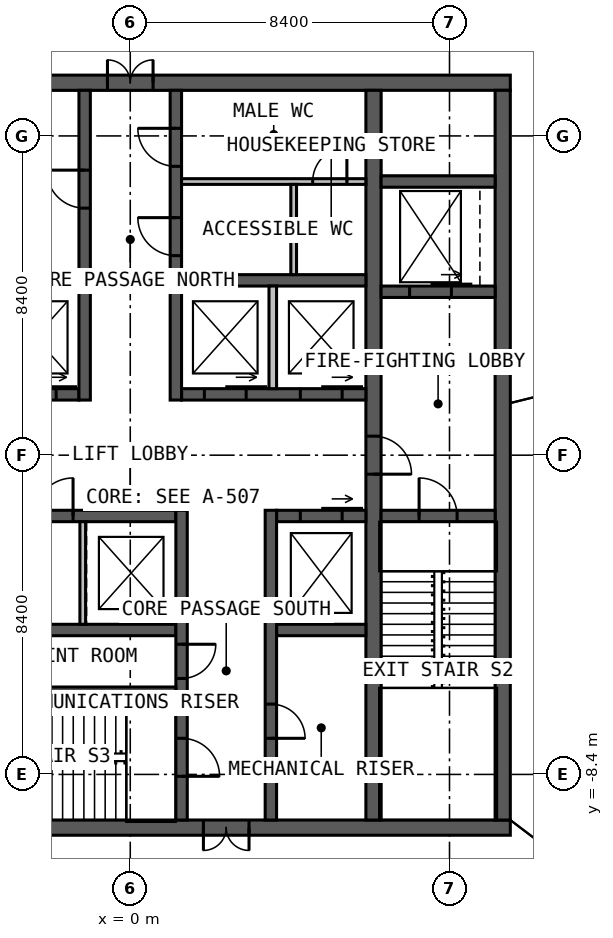
"""IFC4 building model, lengths in metres.
Left out: names, types, materials, properties, quantities, classifications, styles, units other than length and angle.
Written with IfcOpenShell. Run it as: python <this file> out.ifc"""

import sys

from ifc_helpers import new_model, si_unit, direction, frame, frame_2d, origin, place, context, subcontext, project, spatial, rectangle, extrude, element, fill, save


model = new_model("IFC4")
c1 = context("Model", 3, precision=1e-05, world=origin(), true_north=direction((0.0, 1.0)))
c2 = subcontext(c1, "Body", "Model", "MODEL_VIEW")
j1 = project(units=[si_unit("LENGTHUNIT", "METRE"), si_unit("PLANEANGLEUNIT", "RADIAN")], contexts=[c1])
p1 = place(None, origin())
s1 = spatial("IfcSite", under=j1, at=p1, CompositionType="ELEMENT")
p2 = place(p1, origin())
s2 = spatial("IfcBuilding", under=s1, at=p2, CompositionType="ELEMENT")
p3 = place(p2, frame((0.0, 0.0, 260.0)))
s3 = spatial("IfcBuildingStorey", under=s2, at=p3, CompositionType="ELEMENT", Elevation=260.0)
p4 = place(p3, frame((-10.0, 9.8, 0.0), z_axis=(0.0, 0.0, 1.0), x_axis=(1.0, 0.0, 0.0)))
e1 = element("IfcWall", 1, at=p4, inside=s3, PredefinedType="SOLIDWALL", context=c2, shape_type="SweptSolid", body=[
    extrude(rectangle(XDim=20.0, YDim=0.4, at=frame_2d((10.0, 0.0))), origin(), (0.0, 0.0, 1.0), 4.0),
])
p5 = place(p4, frame((9.4, 0.0, 0.0)))
e2 = element("IfcOpeningElement", 2, at=p5, cuts=e1, PredefinedType="OPENING", context=c2, shape_type="SweptSolid", body=[
    extrude(rectangle(XDim=1.2, YDim=2.2, at=frame_2d((0.6, 1.1))), frame((0.0, 0.21, 0.0), z_axis=(0.0, -1.0, 0.0), x_axis=(1.0, 0.0, 0.0)), (0.0, 0.0, 1.0), 0.42),
])
p6 = place(p3, frame((10.0, -9.8, 0.0), z_axis=(0.0, 0.0, 1.0), x_axis=(-1.0, 0.0, 0.0)))
e3 = element("IfcWall", 3, at=p6, inside=s3, PredefinedType="SOLIDWALL", context=c2, shape_type="SweptSolid", body=[
    extrude(rectangle(XDim=20.0, YDim=0.4, at=frame_2d((10.0, 0.0))), origin(), (0.0, 0.0, 1.0), 4.0),
])
p7 = place(p6, frame((6.875, 0.0, 0.0)))
e4 = element("IfcOpeningElement", 4, at=p7, cuts=e3, PredefinedType="OPENING", context=c2, shape_type="SweptSolid", body=[
    extrude(rectangle(XDim=1.2, YDim=2.2, at=frame_2d((0.6, 1.1))), frame((0.0, 0.21, 0.0), z_axis=(0.0, -1.0, 0.0), x_axis=(1.0, 0.0, 0.0)), (0.0, 0.0, 1.0), 0.42),
])
p8 = place(p3, frame((9.8, -9.6, 0.0), z_axis=(0.0, 0.0, 1.0), x_axis=(0.0, 1.0, 0.0)))
e5 = element("IfcWall", 5, at=p8, inside=s3, PredefinedType="SOLIDWALL", context=c2, shape_type="SweptSolid", body=[
    extrude(rectangle(XDim=19.2, YDim=0.4, at=frame_2d((9.6, 0.0))), origin(), (0.0, 0.0, 1.0), 4.0),
])
p9 = place(p3, frame((6.4, 9.6, 0.0), z_axis=(0.0, 0.0, 1.0), x_axis=(0.0, -1.0, 0.0)))
e6 = element("IfcWall", 6, at=p9, inside=s3, PredefinedType="SOLIDWALL", context=c2, shape_type="SweptSolid", body=[
    extrude(rectangle(XDim=19.2, YDim=0.4, at=frame_2d((9.6, 0.0))), origin(), (0.0, 0.0, 1.0), 4.0),
])
p10 = place(p9, frame((9.1, 0.0, 0.0)))
e7 = element("IfcOpeningElement", 7, at=p10, cuts=e6, PredefinedType="OPENING", context=c2, shape_type="SweptSolid", body=[
    extrude(rectangle(XDim=1.0, YDim=2.2, at=frame_2d((0.5, 1.1))), frame((0.0, 0.21, 0.0), z_axis=(0.0, -1.0, 0.0), x_axis=(1.0, 0.0, 0.0)), (0.0, 0.0, 1.0), 0.42),
])
p11 = place(p3, frame((-6.2, 1.6, 0.0), z_axis=(0.0, 0.0, 1.0), x_axis=(1.0, 0.0, 0.0)))
e8 = element("IfcWall", 8, at=p11, inside=s3, PredefinedType="SOLIDWALL", context=c2, shape_type="SweptSolid", body=[
    extrude(rectangle(XDim=4.85, YDim=0.3, at=frame_2d((2.425, 0.0))), origin(), (0.0, 0.0, 1.0), 4.0),
])
p12 = place(p11, frame((0.625, 0.0, 0.0)))
e9 = element("IfcOpeningElement", 9, at=p12, cuts=e8, PredefinedType="OPENING", context=c2, shape_type="SweptSolid", body=[
    extrude(rectangle(XDim=1.1, YDim=2.2, at=frame_2d((0.55, 1.1))), frame((0.0, 0.16, 0.0), z_axis=(0.0, -1.0, 0.0), x_axis=(1.0, 0.0, 0.0)), (0.0, 0.0, 1.0), 0.32),
])
p13 = place(p11, frame((3.15, 0.0, 0.0)))
e10 = element("IfcOpeningElement", 10, at=p13, cuts=e8, PredefinedType="OPENING", context=c2, shape_type="SweptSolid", body=[
    extrude(rectangle(XDim=1.1, YDim=2.2, at=frame_2d((0.55, 1.1))), frame((0.0, 0.16, 0.0), z_axis=(0.0, -1.0, 0.0), x_axis=(1.0, 0.0, 0.0)), (0.0, 0.0, 1.0), 0.32),
])
p14 = place(p3, frame((1.35, 1.6, 0.0), z_axis=(0.0, 0.0, 1.0), x_axis=(1.0, 0.0, 0.0)))
e11 = element("IfcWall", 11, at=p14, inside=s3, PredefinedType="SOLIDWALL", context=c2, shape_type="SweptSolid", body=[
    extrude(rectangle(XDim=4.85, YDim=0.3, at=frame_2d((2.425, 0.0))), origin(), (0.0, 0.0, 1.0), 4.0),
])
p15 = place(p14, frame((0.6, 0.0, 0.0)))
e12 = element("IfcOpeningElement", 12, at=p15, cuts=e11, PredefinedType="OPENING", context=c2, shape_type="SweptSolid", body=[
    extrude(rectangle(XDim=1.1, YDim=2.2, at=frame_2d((0.55, 1.1))), frame((0.0, 0.16, 0.0), z_axis=(0.0, -1.0, 0.0), x_axis=(1.0, 0.0, 0.0)), (0.0, 0.0, 1.0), 0.32),
])
p16 = place(p14, frame((3.125, 0.0, 0.0)))
e13 = element("IfcOpeningElement", 13, at=p16, cuts=e11, PredefinedType="OPENING", context=c2, shape_type="SweptSolid", body=[
    extrude(rectangle(XDim=1.1, YDim=2.2, at=frame_2d((0.55, 1.1))), frame((0.0, 0.16, 0.0), z_axis=(0.0, -1.0, 0.0), x_axis=(1.0, 0.0, 0.0)), (0.0, 0.0, 1.0), 0.32),
])
for number, where, z_axis, x_axis in (
    (14, (-6.2, 4.6, 0.0), (0.0, 0.0, 1.0), (1.0, 0.0, 0.0)),
    (15, (1.35, 4.6, 0.0), (0.0, 0.0, 1.0), (1.0, 0.0, 0.0)),
):
    element("IfcWall", number, at=place(p3, frame(where, z_axis=z_axis, x_axis=x_axis)), inside=s3, PredefinedType="SOLIDWALL", context=c2, shape_type="SweptSolid", body=[
        extrude(rectangle(XDim=4.85, YDim=0.3, at=frame_2d((2.425, 0.0))), origin(), (0.0, 0.0, 1.0), 4.0),
    ])
p17 = place(p3, frame((-1.2, 1.45, 0.0), z_axis=(0.0, 0.0, 1.0), x_axis=(0.0, 1.0, 0.0)))
e16 = element("IfcWall", 16, at=p17, inside=s3, PredefinedType="SOLIDWALL", context=c2, shape_type="SweptSolid", body=[
    extrude(rectangle(XDim=8.15, YDim=0.3, at=frame_2d((4.075, 0.0))), origin(), (0.0, 0.0, 1.0), 4.0),
])
p18 = place(p17, frame((5.05, 0.0, 0.0)))
e17 = element("IfcOpeningElement", 17, at=p18, cuts=e16, PredefinedType="OPENING", context=c2, shape_type="SweptSolid", body=[
    extrude(rectangle(XDim=1.0, YDim=2.2, at=frame_2d((0.5, 1.1))), frame((0.0, 0.16, 0.0), z_axis=(0.0, -1.0, 0.0), x_axis=(1.0, 0.0, 0.0)), (0.0, 0.0, 1.0), 0.32),
])
p19 = place(p3, frame((1.2, 1.45, 0.0), z_axis=(0.0, 0.0, 1.0), x_axis=(0.0, 1.0, 0.0)))
e18 = element("IfcWall", 18, at=p19, inside=s3, PredefinedType="SOLIDWALL", context=c2, shape_type="SweptSolid", body=[
    extrude(rectangle(XDim=8.15, YDim=0.3, at=frame_2d((4.075, 0.0))), origin(), (0.0, 0.0, 1.0), 4.0),
])
p20 = place(p19, frame((3.8, 0.0, 0.0)))
e19 = element("IfcOpeningElement", 19, at=p20, cuts=e18, PredefinedType="OPENING", context=c2, shape_type="SweptSolid", body=[
    extrude(rectangle(XDim=1.0, YDim=2.2, at=frame_2d((0.5, 1.1))), frame((0.0, 0.16, 0.0), z_axis=(0.0, -1.0, 0.0), x_axis=(1.0, 0.0, 0.0)), (0.0, 0.0, 1.0), 0.32),
])
p21 = place(p19, frame((6.15, 0.0, 0.0)))
e20 = element("IfcOpeningElement", 20, at=p21, cuts=e18, PredefinedType="OPENING", context=c2, shape_type="SweptSolid", body=[
    extrude(rectangle(XDim=1.0, YDim=2.2, at=frame_2d((0.5, 1.1))), frame((0.0, 0.16, 0.0), z_axis=(0.0, -1.0, 0.0), x_axis=(1.0, 0.0, 0.0)), (0.0, 0.0, 1.0), 0.32),
])
p22 = place(p3, frame((-6.2, -1.6, 0.0), z_axis=(0.0, 0.0, 1.0), x_axis=(1.0, 0.0, 0.0)))
e21 = element("IfcWall", 21, at=p22, inside=s3, PredefinedType="SOLIDWALL", context=c2, shape_type="SweptSolid", body=[
    extrude(rectangle(XDim=7.4, YDim=0.3, at=frame_2d((3.7, 0.0))), origin(), (0.0, 0.0, 1.0), 4.0),
])
p23 = place(p22, frame((0.675, 0.0, 0.0)))
e22 = element("IfcOpeningElement", 22, at=p23, cuts=e21, PredefinedType="OPENING", context=c2, shape_type="SweptSolid", body=[
    extrude(rectangle(XDim=1.0, YDim=2.2, at=frame_2d((0.5, 1.1))), frame((0.0, 0.16, 0.0), z_axis=(0.0, -1.0, 0.0), x_axis=(1.0, 0.0, 0.0)), (0.0, 0.0, 1.0), 0.32),
])
p24 = place(p22, frame((2.225, 0.0, 0.0)))
e23 = element("IfcOpeningElement", 23, at=p24, cuts=e21, PredefinedType="OPENING", context=c2, shape_type="SweptSolid", body=[
    extrude(rectangle(XDim=1.0, YDim=2.2, at=frame_2d((0.5, 1.1))), frame((0.0, 0.16, 0.0), z_axis=(0.0, -1.0, 0.0), x_axis=(1.0, 0.0, 0.0)), (0.0, 0.0, 1.0), 0.32),
])
p25 = place(p22, frame((3.695, 0.0, 0.0)))
e24 = element("IfcOpeningElement", 24, at=p25, cuts=e21, PredefinedType="OPENING", context=c2, shape_type="SweptSolid", body=[
    extrude(rectangle(XDim=1.0, YDim=2.2, at=frame_2d((0.5, 1.1))), frame((0.0, 0.16, 0.0), z_axis=(0.0, -1.0, 0.0), x_axis=(1.0, 0.0, 0.0)), (0.0, 0.0, 1.0), 0.32),
])
p26 = place(p3, frame((3.85, -1.6, 0.0), z_axis=(0.0, 0.0, 1.0), x_axis=(1.0, 0.0, 0.0)))
e25 = element("IfcWall", 25, at=p26, inside=s3, PredefinedType="SOLIDWALL", context=c2, shape_type="SweptSolid", body=[
    extrude(rectangle(XDim=2.35, YDim=0.3, at=frame_2d((1.175, 0.0))), origin(), (0.0, 0.0, 1.0), 4.0),
])
p27 = place(p26, frame((0.625, 0.0, 0.0)))
e26 = element("IfcOpeningElement", 26, at=p27, cuts=e25, PredefinedType="OPENING", context=c2, shape_type="SweptSolid", body=[
    extrude(rectangle(XDim=1.1, YDim=2.2, at=frame_2d((0.55, 1.1))), frame((0.0, 0.16, 0.0), z_axis=(0.0, -1.0, 0.0), x_axis=(1.0, 0.0, 0.0)), (0.0, 0.0, 1.0), 0.32),
])
p28 = place(p3, frame((-6.2, -4.6, 0.0), z_axis=(0.0, 0.0, 1.0), x_axis=(1.0, 0.0, 0.0)))
e27 = element("IfcWall", 27, at=p28, inside=s3, PredefinedType="SOLIDWALL", context=c2, shape_type="SweptSolid", body=[
    extrude(rectangle(XDim=7.4, YDim=0.3, at=frame_2d((3.7, 0.0))), origin(), (0.0, 0.0, 1.0), 4.0),
])
p29 = place(p3, frame((3.85, -4.6, 0.0), z_axis=(0.0, 0.0, 1.0), x_axis=(1.0, 0.0, 0.0)))
e28 = element("IfcWall", 28, at=p29, inside=s3, PredefinedType="SOLIDWALL", context=c2, shape_type="SweptSolid", body=[
    extrude(rectangle(XDim=2.35, YDim=0.3, at=frame_2d((1.175, 0.0))), origin(), (0.0, 0.0, 1.0), 4.0),
])
p30 = place(p3, frame((1.35, -1.45, 0.0), z_axis=(0.0, 0.0, 1.0), x_axis=(0.0, -1.0, 0.0)))
e29 = element("IfcWall", 29, at=p30, inside=s3, PredefinedType="SOLIDWALL", context=c2, shape_type="SweptSolid", body=[
    extrude(rectangle(XDim=8.15, YDim=0.3, at=frame_2d((4.075, 0.0))), origin(), (0.0, 0.0, 1.0), 4.0),
])
p31 = place(p30, frame((6.0, 0.0, 0.0)))
e30 = element("IfcOpeningElement", 30, at=p31, cuts=e29, PredefinedType="OPENING", context=c2, shape_type="SweptSolid", body=[
    extrude(rectangle(XDim=1.0, YDim=2.2, at=frame_2d((0.5, 1.1))), frame((0.0, 0.16, 0.0), z_axis=(0.0, -1.0, 0.0), x_axis=(1.0, 0.0, 0.0)), (0.0, 0.0, 1.0), 0.32),
])
p32 = place(p30, frame((3.525, 0.0, 0.0)))
e31 = element("IfcOpeningElement", 31, at=p32, cuts=e29, PredefinedType="OPENING", context=c2, shape_type="SweptSolid", body=[
    extrude(rectangle(XDim=0.9, YDim=2.2, at=frame_2d((0.45, 1.1))), frame((0.0, 0.16, 0.0), z_axis=(0.0, -1.0, 0.0), x_axis=(1.0, 0.0, 0.0)), (0.0, 0.0, 1.0), 0.32),
])
p33 = place(p3, frame((3.7, -1.45, 0.0), z_axis=(0.0, 0.0, 1.0), x_axis=(0.0, -1.0, 0.0)))
e32 = element("IfcWall", 32, at=p33, inside=s3, PredefinedType="SOLIDWALL", context=c2, shape_type="SweptSolid", body=[
    extrude(rectangle(XDim=8.15, YDim=0.3, at=frame_2d((4.075, 0.0))), origin(), (0.0, 0.0, 1.0), 4.0),
])
p34 = place(p33, frame((5.1, 0.0, 0.0)))
e33 = element("IfcOpeningElement", 33, at=p34, cuts=e32, PredefinedType="OPENING", context=c2, shape_type="SweptSolid", body=[
    extrude(rectangle(XDim=0.9, YDim=2.2, at=frame_2d((0.45, 1.1))), frame((0.0, 0.16, 0.0), z_axis=(0.0, -1.0, 0.0), x_axis=(1.0, 0.0, 0.0)), (0.0, 0.0, 1.0), 0.32),
])
p35 = place(p3, frame((-6.2, -6.2, 0.0), z_axis=(0.0, 0.0, 1.0), x_axis=(1.0, 0.0, 0.0)))
e34 = element("IfcWall", 34, at=p35, inside=s3, PredefinedType="SOLIDWALL", context=c2, shape_type="SweptSolid", body=[
    extrude(rectangle(XDim=7.4, YDim=0.2, at=frame_2d((3.7, 0.0))), origin(), (0.0, 0.0, 1.0), 4.0),
])
p36 = place(p3, frame((6.6, -1.6, 0.0), z_axis=(0.0, 0.0, 1.0), x_axis=(1.0, 0.0, 0.0)))
e35 = element("IfcWall", 35, at=p36, inside=s3, PredefinedType="SOLIDWALL", context=c2, shape_type="SweptSolid", body=[
    extrude(rectangle(XDim=3.0, YDim=0.3, at=frame_2d((1.5, 0.0))), origin(), (0.0, 0.0, 1.0), 4.0),
])
p37 = place(p36, frame((1.0, 0.0, 0.0)))
e36 = element("IfcOpeningElement", 36, at=p37, cuts=e35, PredefinedType="OPENING", context=c2, shape_type="SweptSolid", body=[
    extrude(rectangle(XDim=1.0, YDim=2.2, at=frame_2d((0.5, 1.1))), frame((0.0, 0.16, 0.0), z_axis=(0.0, -1.0, 0.0), x_axis=(1.0, 0.0, 0.0)), (0.0, 0.0, 1.0), 0.32),
])
p38 = place(p3, frame((6.6, 4.3, 0.0), z_axis=(0.0, 0.0, 1.0), x_axis=(1.0, 0.0, 0.0)))
e37 = element("IfcWall", 37, at=p38, inside=s3, PredefinedType="SOLIDWALL", context=c2, shape_type="SweptSolid", body=[
    extrude(rectangle(XDim=3.0, YDim=0.3, at=frame_2d((1.5, 0.0))), origin(), (0.0, 0.0, 1.0), 4.0),
])
p39 = place(p38, frame((0.75, 0.0, 0.0)))
e38 = element("IfcOpeningElement", 38, at=p39, cuts=e37, PredefinedType="OPENING", context=c2, shape_type="SweptSolid", body=[
    extrude(rectangle(XDim=1.1, YDim=2.2, at=frame_2d((0.55, 1.1))), frame((0.0, 0.16, 0.0), z_axis=(0.0, -1.0, 0.0), x_axis=(1.0, 0.0, 0.0)), (0.0, 0.0, 1.0), 0.32),
])
p40 = place(p3, frame((6.6, 7.2, 0.0), z_axis=(0.0, 0.0, 1.0), x_axis=(1.0, 0.0, 0.0)))
e39 = element("IfcWall", 39, at=p40, inside=s3, PredefinedType="SOLIDWALL", context=c2, shape_type="SweptSolid", body=[
    extrude(rectangle(XDim=3.0, YDim=0.3, at=frame_2d((1.5, 0.0))), origin(), (0.0, 0.0, 1.0), 4.0),
])
p41 = place(p3, frame((3.75, 1.75, 0.0), z_axis=(0.0, 0.0, 1.0), x_axis=(0.0, 1.0, 0.0)))
e40 = element("IfcWall", 40, at=p41, inside=s3, PredefinedType="SOLIDWALL", context=c2, shape_type="SweptSolid", body=[
    extrude(rectangle(XDim=2.7, YDim=0.2, at=frame_2d((1.35, 0.0))), origin(), (0.0, 0.0, 1.0), 3.75),
])
p42 = place(p3, frame((1.35, 7.2, 0.0), z_axis=(0.0, 0.0, 1.0), x_axis=(1.0, 0.0, 0.0)))
e41 = element("IfcWall", 41, at=p42, inside=s3, PredefinedType="PARTITIONING", context=c2, shape_type="SweptSolid", body=[
    extrude(rectangle(XDim=4.85, YDim=0.15, at=frame_2d((2.425, 0.0))), origin(), (0.0, 0.0, 1.0), 3.75),
])
p43 = place(p42, frame((3.45, 0.0, 0.0)))
e42 = element("IfcOpeningElement", 42, at=p43, cuts=e41, PredefinedType="OPENING", context=c2, shape_type="SweptSolid", body=[
    extrude(rectangle(XDim=0.9, YDim=2.2, at=frame_2d((0.45, 1.1))), frame((0.0, 0.085, 0.0), z_axis=(0.0, -1.0, 0.0), x_axis=(1.0, 0.0, 0.0)), (0.0, 0.0, 1.0), 0.17),
])
p44 = place(p3, frame((4.3, 4.75, 0.0), z_axis=(0.0, 0.0, 1.0), x_axis=(0.0, 1.0, 0.0)))
e43 = element("IfcWall", 43, at=p44, inside=s3, PredefinedType="PARTITIONING", context=c2, shape_type="SweptSolid", body=[
    extrude(rectangle(XDim=2.375, YDim=0.15, at=frame_2d((1.188, 0.0))), origin(), (0.0, 0.0, 1.0), 3.75),
])
p45 = place(p3, frame((-1.25, -1.75, 0.0), z_axis=(0.0, 0.0, 1.0), x_axis=(0.0, -1.0, 0.0)))
e44 = element("IfcWall", 44, at=p45, inside=s3, PredefinedType="PARTITIONING", context=c2, shape_type="SweptSolid", body=[
    extrude(rectangle(XDim=2.7, YDim=0.15, at=frame_2d((1.35, 0.0))), origin(), (0.0, 0.0, 1.0), 3.75),
])
p46 = place(p5, origin())
e45 = element("IfcDoor", 45, at=p46, inside=s3, OperationType="DOUBLE_DOOR_SINGLE_SWING", PredefinedType="DOOR", context=c2, shape_type="SweptSolid", body=[
    extrude(rectangle(XDim=1.2, YDim=2.2, at=frame_2d((0.6, 1.1))), frame((0.0, 0.025, 0.0), z_axis=(0.0, -1.0, 0.0), x_axis=(1.0, 0.0, 0.0)), (0.0, 0.0, 1.0), 0.05),
])
fill(e2, e45)
p47 = place(p7, origin())
e46 = element("IfcDoor", 46, at=p47, inside=s3, OperationType="DOUBLE_DOOR_SINGLE_SWING", PredefinedType="DOOR", context=c2, shape_type="SweptSolid", body=[
    extrude(rectangle(XDim=1.2, YDim=2.2, at=frame_2d((0.6, 1.1))), frame((0.0, 0.025, 0.0), z_axis=(0.0, -1.0, 0.0), x_axis=(1.0, 0.0, 0.0)), (0.0, 0.0, 1.0), 0.05),
])
fill(e4, e46)
p48 = place(p10, origin())
e47 = element("IfcDoor", 47, at=p48, inside=s3, OperationType="SINGLE_SWING_RIGHT", PredefinedType="DOOR", context=c2, shape_type="SweptSolid", body=[
    extrude(rectangle(XDim=1.0, YDim=2.2, at=frame_2d((0.5, 1.1))), frame((0.0, 0.025, 0.0), z_axis=(0.0, -1.0, 0.0), x_axis=(1.0, 0.0, 0.0)), (0.0, 0.0, 1.0), 0.05),
])
fill(e7, e47)
p49 = place(p37, origin())
e48 = element("IfcDoor", 48, at=p49, inside=s3, OperationType="SINGLE_SWING_LEFT", PredefinedType="DOOR", context=c2, shape_type="SweptSolid", body=[
    extrude(rectangle(XDim=1.0, YDim=2.2, at=frame_2d((0.5, 1.1))), frame((0.0, 0.025, 0.0), z_axis=(0.0, -1.0, 0.0), x_axis=(1.0, 0.0, 0.0)), (0.0, 0.0, 1.0), 0.05),
])
fill(e36, e48)
p50 = place(p31, origin())
e49 = element("IfcDoor", 49, at=p50, inside=s3, OperationType="SINGLE_SWING_RIGHT", PredefinedType="DOOR", context=c2, shape_type="SweptSolid", body=[
    extrude(rectangle(XDim=1.0, YDim=2.2, at=frame_2d((0.5, 1.1))), frame((0.0, 0.025, 0.0), z_axis=(0.0, -1.0, 0.0), x_axis=(1.0, 0.0, 0.0)), (0.0, 0.0, 1.0), 0.05),
])
fill(e30, e49)
p51 = place(p18, origin())
e50 = element("IfcDoor", 50, at=p51, inside=s3, OperationType="SINGLE_SWING_RIGHT", PredefinedType="DOOR", context=c2, shape_type="SweptSolid", body=[
    extrude(rectangle(XDim=1.0, YDim=2.2, at=frame_2d((0.5, 1.1))), frame((0.0, 0.025, 0.0), z_axis=(0.0, -1.0, 0.0), x_axis=(1.0, 0.0, 0.0)), (0.0, 0.0, 1.0), 0.05),
])
fill(e17, e50)
p52 = place(p20, origin())
e51 = element("IfcDoor", 51, at=p52, inside=s3, OperationType="SINGLE_SWING_RIGHT", PredefinedType="DOOR", context=c2, shape_type="SweptSolid", body=[
    extrude(rectangle(XDim=1.0, YDim=2.2, at=frame_2d((0.5, 1.1))), frame((0.0, 0.025, 0.0), z_axis=(0.0, -1.0, 0.0), x_axis=(1.0, 0.0, 0.0)), (0.0, 0.0, 1.0), 0.05),
])
fill(e19, e51)
p53 = place(p21, origin())
e52 = element("IfcDoor", 52, at=p53, inside=s3, OperationType="SINGLE_SWING_RIGHT", PredefinedType="DOOR", context=c2, shape_type="SweptSolid", body=[
    extrude(rectangle(XDim=1.0, YDim=2.2, at=frame_2d((0.5, 1.1))), frame((0.0, 0.025, 0.0), z_axis=(0.0, -1.0, 0.0), x_axis=(1.0, 0.0, 0.0)), (0.0, 0.0, 1.0), 0.05),
])
fill(e20, e52)
p54 = place(p32, origin())
e53 = element("IfcDoor", 53, at=p54, inside=s3, OperationType="SINGLE_SWING_LEFT", PredefinedType="DOOR", context=c2, shape_type="SweptSolid", body=[
    extrude(rectangle(XDim=0.9, YDim=2.2, at=frame_2d((0.45, 1.1))), frame((0.0, 0.025, 0.0), z_axis=(0.0, -1.0, 0.0), x_axis=(1.0, 0.0, 0.0)), (0.0, 0.0, 1.0), 0.05),
])
fill(e31, e53)
p55 = place(p34, origin())
e54 = element("IfcDoor", 54, at=p55, inside=s3, OperationType="SINGLE_SWING_RIGHT", PredefinedType="DOOR", context=c2, shape_type="SweptSolid", body=[
    extrude(rectangle(XDim=0.9, YDim=2.2, at=frame_2d((0.45, 1.1))), frame((0.0, 0.025, 0.0), z_axis=(0.0, -1.0, 0.0), x_axis=(1.0, 0.0, 0.0)), (0.0, 0.0, 1.0), 0.05),
])
fill(e33, e54)
p56 = place(p43, origin())
e55 = element("IfcDoor", 55, at=p56, inside=s3, OperationType="SINGLE_SWING_RIGHT", PredefinedType="DOOR", context=c2, shape_type="SweptSolid", body=[
    extrude(rectangle(XDim=0.9, YDim=2.2, at=frame_2d((0.45, 1.1))), frame((0.0, 0.025, 0.0), z_axis=(0.0, -1.0, 0.0), x_axis=(1.0, 0.0, 0.0)), (0.0, 0.0, 1.0), 0.05),
])
fill(e42, e55)
p57 = place(p25, origin())
e56 = element("IfcDoor", 56, at=p57, inside=s3, OperationType="SINGLE_SWING_RIGHT", PredefinedType="DOOR", context=c2, shape_type="SweptSolid", body=[
    extrude(rectangle(XDim=1.0, YDim=2.2, at=frame_2d((0.5, 1.1))), frame((0.0, 0.025, 0.0), z_axis=(0.0, -1.0, 0.0), x_axis=(1.0, 0.0, 0.0)), (0.0, 0.0, 1.0), 0.05),
])
fill(e24, e56)
p58 = place(p13, origin())
e57 = element("IfcDoor", 57, at=p58, inside=s3, OperationType="SLIDING_TO_LEFT", PredefinedType="DOOR", context=c2, shape_type="SweptSolid", body=[
    extrude(rectangle(XDim=1.1, YDim=2.2, at=frame_2d((0.55, 1.1))), frame((0.0, 0.025, 0.0), z_axis=(0.0, -1.0, 0.0), x_axis=(1.0, 0.0, 0.0)), (0.0, 0.0, 1.0), 0.05),
])
fill(e10, e57)
p59 = place(p15, origin())
e58 = element("IfcDoor", 58, at=p59, inside=s3, OperationType="SLIDING_TO_LEFT", PredefinedType="DOOR", context=c2, shape_type="SweptSolid", body=[
    extrude(rectangle(XDim=1.1, YDim=2.2, at=frame_2d((0.55, 1.1))), frame((0.0, 0.025, 0.0), z_axis=(0.0, -1.0, 0.0), x_axis=(1.0, 0.0, 0.0)), (0.0, 0.0, 1.0), 0.05),
])
fill(e12, e58)
p60 = place(p16, origin())
e59 = element("IfcDoor", 59, at=p60, inside=s3, OperationType="SLIDING_TO_LEFT", PredefinedType="DOOR", context=c2, shape_type="SweptSolid", body=[
    extrude(rectangle(XDim=1.1, YDim=2.2, at=frame_2d((0.55, 1.1))), frame((0.0, 0.025, 0.0), z_axis=(0.0, -1.0, 0.0), x_axis=(1.0, 0.0, 0.0)), (0.0, 0.0, 1.0), 0.05),
])
fill(e13, e59)
p61 = place(p27, origin())
e60 = element("IfcDoor", 60, at=p61, inside=s3, OperationType="SLIDING_TO_LEFT", PredefinedType="DOOR", context=c2, shape_type="SweptSolid", body=[
    extrude(rectangle(XDim=1.1, YDim=2.2, at=frame_2d((0.55, 1.1))), frame((0.0, 0.025, 0.0), z_axis=(0.0, -1.0, 0.0), x_axis=(1.0, 0.0, 0.0)), (0.0, 0.0, 1.0), 0.05),
])
fill(e26, e60)
p62 = place(p39, origin())
e61 = element("IfcDoor", 61, at=p62, inside=s3, OperationType="SLIDING_TO_LEFT", PredefinedType="DOOR", context=c2, shape_type="SweptSolid", body=[
    extrude(rectangle(XDim=1.1, YDim=2.2, at=frame_2d((0.55, 1.1))), frame((0.0, 0.025, 0.0), z_axis=(0.0, -1.0, 0.0), x_axis=(1.0, 0.0, 0.0)), (0.0, 0.0, 1.0), 0.05),
])
fill(e38, e61)
save(model, sys.argv[1])
